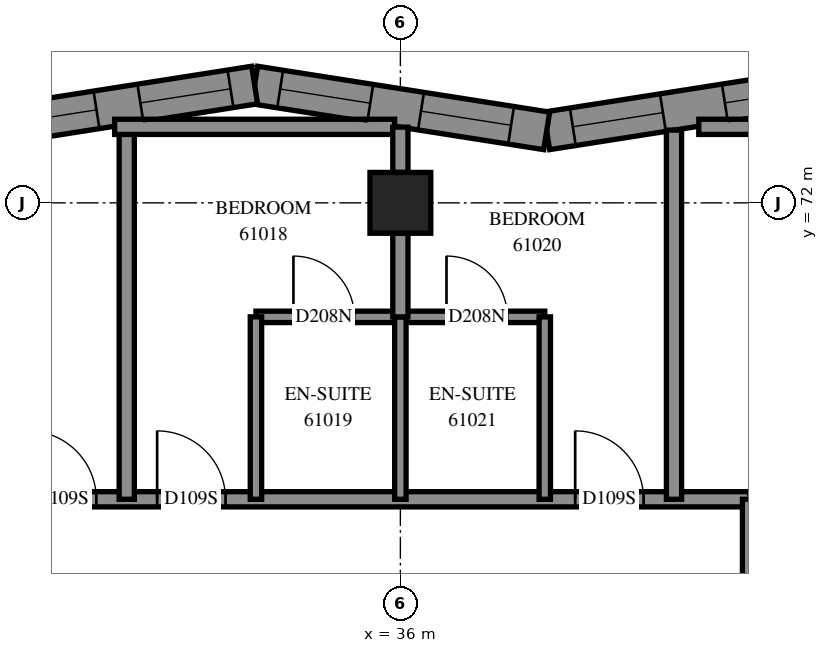
"""IFC4 building model, lengths in metres.
Left out: names, types, materials, properties, quantities, classifications, styles, units other than length and angle.
Written with IfcOpenShell. Run it as: python <this file> out.ifc"""

import sys

from ifc_helpers import new_model, si_unit, direction, frame, frame_2d, origin, origin_2d, place, context, subcontext, project, spatial, polyline, rectangle, outline, extrude, element, fill, save


model = new_model("IFC4")
c1 = context("Model", 3, precision=1e-05, world=origin(), true_north=direction((0.0, 1.0)))
c2 = subcontext(c1, "Body", "Model", "MODEL_VIEW")
j1 = project(units=[si_unit("LENGTHUNIT", "METRE"), si_unit("PLANEANGLEUNIT", "RADIAN")], contexts=[c1])
p1 = place(None, origin())
s1 = spatial("IfcSite", under=j1, at=p1, CompositionType="ELEMENT")
p2 = place(p1, origin())
s2 = spatial("IfcBuilding", under=s1, at=p2, CompositionType="ELEMENT")
p3 = place(p2, frame((0.0, 0.0, 223.6)))
s3 = spatial("IfcBuildingStorey", under=s2, at=p3, CompositionType="ELEMENT", Elevation=223.6)
p4 = place(p3, frame((36.0, 72.0, 0.0), z_axis=(0.0, 0.0, 1.0), x_axis=(1.0, 0.0, 0.0)))
e1 = element("IfcColumn", 1, at=p4, inside=s3, PredefinedType="COLUMN", context=c2, shape_type="SweptSolid", body=[
    extrude(rectangle(XDim=0.8, YDim=0.8, at=origin_2d()), origin(), (0.0, 0.0, 1.0), 3.1),
])
p5 = place(p3, frame((41.768, 73.55, 0.0), z_axis=(0.0, 0.0, 1.0), x_axis=(-0.9879113447, -0.155019918, 0.0)))
e2 = element("IfcWall", 2, at=p5, inside=s3, PredefinedType="SOLIDWALL", context=c2, shape_type="SweptSolid", body=[
    extrude(outline(polyline([(-0.039, -0.25), (3.85, -0.25), (3.929, 0.25), (0.039, 0.25), (-0.039, -0.25)])), origin(), (0.0, 0.0, 1.0), 3.1),
])
p6 = place(p5, frame((0.317, 0.0, 0.45)))
e3 = element("IfcOpeningElement", 3, at=p6, cuts=e2, PredefinedType="OPENING", context=c2, shape_type="SweptSolid", body=[
    extrude(rectangle(XDim=1.2, YDim=2.5, at=frame_2d((0.6, 1.25))), frame((0.0, 0.26, 0.0), z_axis=(0.0, -1.0, 0.0), x_axis=(1.0, 0.0, 0.0)), (0.0, 0.0, 1.0), 0.52),
])
p7 = place(p5, frame((2.342, 0.0, 0.45)))
e4 = element("IfcOpeningElement", 4, at=p7, cuts=e2, PredefinedType="OPENING", context=c2, shape_type="SweptSolid", body=[
    extrude(rectangle(XDim=1.2, YDim=2.5, at=frame_2d((0.6, 1.25))), frame((0.0, 0.26, 0.0), z_axis=(0.0, -1.0, 0.0), x_axis=(1.0, 0.0, 0.0)), (0.0, 0.0, 1.0), 0.52),
])
p8 = place(p3, frame((37.925, 72.947, 0.0), z_axis=(0.0, 0.0, 1.0), x_axis=(-0.9879107269, 0.1550238552, 0.0)))
e5 = element("IfcWall", 5, at=p8, inside=s3, PredefinedType="SOLIDWALL", context=c2, shape_type="SweptSolid", body=[
    extrude(outline(polyline([(0.039, -0.25), (3.929, -0.25), (3.85, 0.25), (-0.039, 0.25), (0.039, -0.25)])), origin(), (0.0, 0.0, 1.0), 3.1),
])
p9 = place(p8, frame((0.474, 0.0, 0.45)))
e6 = element("IfcOpeningElement", 6, at=p9, cuts=e5, PredefinedType="OPENING", context=c2, shape_type="SweptSolid", body=[
    extrude(rectangle(XDim=1.2, YDim=2.5, at=frame_2d((0.6, 1.25))), frame((0.0, 0.26, 0.0), z_axis=(0.0, -1.0, 0.0), x_axis=(1.0, 0.0, 0.0)), (0.0, 0.0, 1.0), 0.52),
])
p10 = place(p8, frame((2.35, 0.0, 0.45)))
e7 = element("IfcOpeningElement", 7, at=p10, cuts=e5, PredefinedType="OPENING", context=c2, shape_type="SweptSolid", body=[
    extrude(rectangle(XDim=1.2, YDim=2.5, at=frame_2d((0.6, 1.25))), frame((0.0, 0.26, 0.0), z_axis=(0.0, -1.0, 0.0), x_axis=(1.0, 0.0, 0.0)), (0.0, 0.0, 1.0), 0.52),
])
p11 = place(p3, frame((34.083, 73.55, 0.0), z_axis=(0.0, 0.0, 1.0), x_axis=(-0.9879139197, -0.1550035072, 0.0)))
e8 = element("IfcWall", 8, at=p11, inside=s3, PredefinedType="SOLIDWALL", context=c2, shape_type="SweptSolid", body=[
    extrude(outline(polyline([(-0.039, -0.25), (3.85, -0.25), (3.967, 0.25), (0.039, 0.25), (-0.039, -0.25)])), origin(), (0.0, 0.0, 1.0), 3.1),
])
p12 = place(p11, frame((0.321, 0.0, 0.45)))
e9 = element("IfcOpeningElement", 9, at=p12, cuts=e8, PredefinedType="OPENING", context=c2, shape_type="SweptSolid", body=[
    extrude(rectangle(XDim=1.2, YDim=2.5, at=frame_2d((0.6, 1.25))), frame((0.0, 0.26, 0.0), z_axis=(0.0, -1.0, 0.0), x_axis=(1.0, 0.0, 0.0)), (0.0, 0.0, 1.0), 0.52),
])
p13 = place(p11, frame((2.106, 0.0, 0.45)))
e10 = element("IfcOpeningElement", 10, at=p13, cuts=e8, PredefinedType="OPENING", context=c2, shape_type="SweptSolid", body=[
    extrude(rectangle(XDim=1.2, YDim=2.5, at=frame_2d((0.6, 1.25))), frame((0.0, 0.26, 0.0), z_axis=(0.0, -1.0, 0.0), x_axis=(1.0, 0.0, 0.0)), (0.0, 0.0, 1.0), 0.52),
])
p14 = place(p3, frame((28.8, 68.1, 0.0), z_axis=(0.0, 0.0, 1.0), x_axis=(1.0, 0.0, 0.0)))
e11 = element("IfcWall", 11, at=p14, inside=s3, PredefinedType="PARTITIONING", context=c2, shape_type="SweptSolid", body=[
    extrude(rectangle(XDim=11.8, YDim=0.2, at=frame_2d((5.9, 0.0))), origin(), (0.0, 0.0, 1.0), 3.1),
])
p15 = place(p14, frame((2.3, 0.0, 0.0)))
e12 = element("IfcOpeningElement", 12, at=p15, cuts=e11, PredefinedType="OPENING", context=c2, shape_type="SweptSolid", body=[
    extrude(rectangle(XDim=0.9, YDim=2.1, at=frame_2d((0.45, 1.05))), frame((0.0, 0.11, 0.0), z_axis=(0.0, -1.0, 0.0), x_axis=(1.0, 0.0, 0.0)), (0.0, 0.0, 1.0), 0.22),
])
p16 = place(p14, frame((4.0, 0.0, 0.0)))
e13 = element("IfcOpeningElement", 13, at=p16, cuts=e11, PredefinedType="OPENING", context=c2, shape_type="SweptSolid", body=[
    extrude(rectangle(XDim=0.9, YDim=2.1, at=frame_2d((0.45, 1.05))), frame((0.0, 0.11, 0.0), z_axis=(0.0, -1.0, 0.0), x_axis=(1.0, 0.0, 0.0)), (0.0, 0.0, 1.0), 0.22),
])
p17 = place(p14, frame((9.5, 0.0, 0.0)))
e14 = element("IfcOpeningElement", 14, at=p17, cuts=e11, PredefinedType="OPENING", context=c2, shape_type="SweptSolid", body=[
    extrude(rectangle(XDim=0.9, YDim=2.1, at=frame_2d((0.45, 1.05))), frame((0.0, 0.11, 0.0), z_axis=(0.0, -1.0, 0.0), x_axis=(1.0, 0.0, 0.0)), (0.0, 0.0, 1.0), 0.22),
])
p18 = place(p3, frame((32.4, 68.1, 0.0), z_axis=(0.0, 0.0, 1.0), x_axis=(0.0, 1.0, 0.0)))
e15 = element("IfcWall", 15, at=p18, inside=s3, PredefinedType="PARTITIONING", context=c2, shape_type="SweptSolid", body=[
    extrude(rectangle(XDim=4.933, YDim=0.2, at=frame_2d((2.466, 0.0))), origin(), (0.0, 0.0, 1.0), 3.1),
])
p19 = place(p3, frame((39.6, 68.1, 0.0), z_axis=(0.0, 0.0, 1.0), x_axis=(0.0, 1.0, 0.0)))
e16 = element("IfcWall", 16, at=p19, inside=s3, PredefinedType="PARTITIONING", context=c2, shape_type="SweptSolid", body=[
    extrude(rectangle(XDim=4.857, YDim=0.2, at=frame_2d((2.428, 0.0))), origin(), (0.0, 0.0, 1.0), 3.1),
])
p20 = place(p3, frame((40.6, 63.402, 0.0), z_axis=(0.0, 0.0, 1.0), x_axis=(0.0, 1.0, 0.0)))
e17 = element("IfcWall", 17, at=p20, inside=s3, PredefinedType="PARTITIONING", context=c2, shape_type="SweptSolid", body=[
    extrude(rectangle(XDim=4.698, YDim=0.2, at=frame_2d((2.349, 0.0))), origin(), (0.0, 0.0, 1.0), 3.1),
])
p21 = place(p20, frame((0.146, 0.0, 0.0)))
e18 = element("IfcOpeningElement", 18, at=p21, cuts=e17, PredefinedType="OPENING", context=c2, shape_type="SweptSolid", body=[
    extrude(rectangle(XDim=1.0, YDim=2.1, at=frame_2d((0.5, 1.05))), frame((0.0, 0.11, 0.0), z_axis=(0.0, -1.0, 0.0), x_axis=(1.0, 0.0, 0.0)), (0.0, 0.0, 1.0), 0.22),
])
p22 = place(p3, frame((34.1, 70.5, 0.0), z_axis=(0.0, 0.0, 1.0), x_axis=(1.0, 0.0, 0.0)))
e19 = element("IfcWall", 19, at=p22, inside=s3, PredefinedType="PARTITIONING", context=c2, shape_type="SweptSolid", body=[
    extrude(rectangle(XDim=3.8, YDim=0.15, at=frame_2d((1.9, 0.0))), origin(), (0.0, 0.0, 1.0), 3.1),
])
p23 = place(p22, frame((0.493, 0.0, 0.0)))
e20 = element("IfcOpeningElement", 20, at=p23, cuts=e19, PredefinedType="OPENING", context=c2, shape_type="SweptSolid", body=[
    extrude(rectangle(XDim=0.8, YDim=2.1, at=frame_2d((0.4, 1.05))), frame((0.0, 0.085, 0.0), z_axis=(0.0, -1.0, 0.0), x_axis=(1.0, 0.0, 0.0)), (0.0, 0.0, 1.0), 0.17),
])
p24 = place(p22, frame((2.507, 0.0, 0.0)))
e21 = element("IfcOpeningElement", 21, at=p24, cuts=e19, PredefinedType="OPENING", context=c2, shape_type="SweptSolid", body=[
    extrude(rectangle(XDim=0.8, YDim=2.1, at=frame_2d((0.4, 1.05))), frame((0.0, 0.085, 0.0), z_axis=(0.0, -1.0, 0.0), x_axis=(1.0, 0.0, 0.0)), (0.0, 0.0, 1.0), 0.17),
])
for number, where, z_axis, x_axis in (
    (22, (32.24, 73.0, 0.0), (0.0, 0.0, 1.0), (1.0, 0.0, 0.0)),
    (23, (39.926, 73.0, 0.0), (0.0, 0.0, 1.0), (1.0, 0.0, 0.0)),
):
    element("IfcWall", number, at=place(p3, frame(where, z_axis=z_axis, x_axis=x_axis)), inside=s3, PredefinedType="PARTITIONING", context=c2, shape_type="SweptSolid", body=[
        extrude(rectangle(XDim=3.684, YDim=0.2, at=frame_2d((1.842, 0.0))), origin(), (0.0, 0.0, 1.0), 3.1),
    ])
for number, where, z_axis, x_axis in (
    (24, (34.1, 68.1, 0.0), (0.0, 0.0, 1.0), (0.0, 1.0, 0.0)),
    (25, (37.9, 68.1, 0.0), (0.0, 0.0, 1.0), (0.0, 1.0, 0.0)),
    (26, (36.0, 68.1, 0.0), (0.0, 0.0, 1.0), (0.0, 1.0, 0.0)),
):
    element("IfcWall", number, at=place(p3, frame(where, z_axis=z_axis, x_axis=x_axis)), inside=s3, PredefinedType="PARTITIONING", context=c2, shape_type="SweptSolid", body=[
        extrude(rectangle(XDim=2.4, YDim=0.15, at=frame_2d((1.2, 0.0))), origin(), (0.0, 0.0, 1.0), 3.1),
    ])
p25 = place(p3, frame((36.0, 70.5, 0.0), z_axis=(0.0, 0.0, 1.0), x_axis=(0.0, 1.0, 0.0)))
e27 = element("IfcWall", 27, at=p25, inside=s3, PredefinedType="PARTITIONING", context=c2, shape_type="SweptSolid", body=[
    extrude(rectangle(XDim=1.1, YDim=0.2, at=frame_2d((0.55, 0.0))), origin(), (0.0, 0.0, 1.0), 3.1),
])
p26 = place(p3, frame((36.0, 72.4, 0.0), z_axis=(0.0, 0.0, 1.0), x_axis=(0.0, 1.0, 0.0)))
e28 = element("IfcWall", 28, at=p26, inside=s3, PredefinedType="PARTITIONING", context=c2, shape_type="SweptSolid", body=[
    extrude(rectangle(XDim=0.596, YDim=0.2, at=frame_2d((0.298, 0.0))), origin(), (0.0, 0.0, 1.0), 3.1),
])
p27 = place(p6, origin())
e29 = element("IfcWindow", 29, at=p27, inside=s3, PartitioningType="SINGLE_PANEL", PredefinedType="WINDOW", context=c2, shape_type="SweptSolid", body=[
    extrude(rectangle(XDim=1.2, YDim=2.5, at=frame_2d((0.6, 1.25))), frame((0.0, 0.18, 0.0), z_axis=(0.0, -1.0, 0.0), x_axis=(1.0, 0.0, 0.0)), (0.0, 0.0, 1.0), 0.06),
])
fill(e3, e29)
p28 = place(p7, origin())
e30 = element("IfcWindow", 30, at=p28, inside=s3, PartitioningType="SINGLE_PANEL", PredefinedType="WINDOW", context=c2, shape_type="SweptSolid", body=[
    extrude(rectangle(XDim=1.2, YDim=2.5, at=frame_2d((0.6, 1.25))), frame((0.0, 0.18, 0.0), z_axis=(0.0, -1.0, 0.0), x_axis=(1.0, 0.0, 0.0)), (0.0, 0.0, 1.0), 0.06),
])
fill(e4, e30)
p29 = place(p9, origin())
e31 = element("IfcWindow", 31, at=p29, inside=s3, PartitioningType="SINGLE_PANEL", PredefinedType="WINDOW", context=c2, shape_type="SweptSolid", body=[
    extrude(rectangle(XDim=1.2, YDim=2.5, at=frame_2d((0.6, 1.25))), frame((0.0, 0.18, 0.0), z_axis=(0.0, -1.0, 0.0), x_axis=(1.0, 0.0, 0.0)), (0.0, 0.0, 1.0), 0.06),
])
fill(e6, e31)
p30 = place(p10, origin())
e32 = element("IfcWindow", 32, at=p30, inside=s3, PartitioningType="SINGLE_PANEL", PredefinedType="WINDOW", context=c2, shape_type="SweptSolid", body=[
    extrude(rectangle(XDim=1.2, YDim=2.5, at=frame_2d((0.6, 1.25))), frame((0.0, 0.18, 0.0), z_axis=(0.0, -1.0, 0.0), x_axis=(1.0, 0.0, 0.0)), (0.0, 0.0, 1.0), 0.06),
])
fill(e7, e32)
p31 = place(p12, origin())
e33 = element("IfcWindow", 33, at=p31, inside=s3, PartitioningType="SINGLE_PANEL", PredefinedType="WINDOW", context=c2, shape_type="SweptSolid", body=[
    extrude(rectangle(XDim=1.2, YDim=2.5, at=frame_2d((0.6, 1.25))), frame((0.0, 0.18, 0.0), z_axis=(0.0, -1.0, 0.0), x_axis=(1.0, 0.0, 0.0)), (0.0, 0.0, 1.0), 0.06),
])
fill(e9, e33)
p32 = place(p13, origin())
e34 = element("IfcWindow", 34, at=p32, inside=s3, PartitioningType="SINGLE_PANEL", PredefinedType="WINDOW", context=c2, shape_type="SweptSolid", body=[
    extrude(rectangle(XDim=1.2, YDim=2.5, at=frame_2d((0.6, 1.25))), frame((0.0, 0.18, 0.0), z_axis=(0.0, -1.0, 0.0), x_axis=(1.0, 0.0, 0.0)), (0.0, 0.0, 1.0), 0.06),
])
fill(e10, e34)
p33 = place(p15, origin())
e35 = element("IfcDoor", 35, at=p33, inside=s3, OperationType="SINGLE_SWING_RIGHT", PredefinedType="DOOR", context=c2, shape_type="SweptSolid", body=[
    extrude(rectangle(XDim=0.9, YDim=2.1, at=frame_2d((0.45, 1.05))), frame((0.0, 0.025, 0.0), z_axis=(0.0, -1.0, 0.0), x_axis=(1.0, 0.0, 0.0)), (0.0, 0.0, 1.0), 0.05),
])
fill(e12, e35)
p34 = place(p16, origin())
e36 = element("IfcDoor", 36, at=p34, inside=s3, OperationType="SINGLE_SWING_LEFT", PredefinedType="DOOR", context=c2, shape_type="SweptSolid", body=[
    extrude(rectangle(XDim=0.9, YDim=2.1, at=frame_2d((0.45, 1.05))), frame((0.0, 0.025, 0.0), z_axis=(0.0, -1.0, 0.0), x_axis=(1.0, 0.0, 0.0)), (0.0, 0.0, 1.0), 0.05),
])
fill(e13, e36)
p35 = place(p23, origin())
e37 = element("IfcDoor", 37, at=p35, inside=s3, OperationType="SINGLE_SWING_RIGHT", PredefinedType="DOOR", context=c2, shape_type="SweptSolid", body=[
    extrude(rectangle(XDim=0.8, YDim=2.1, at=frame_2d((0.4, 1.05))), frame((0.0, 0.025, 0.0), z_axis=(0.0, -1.0, 0.0), x_axis=(1.0, 0.0, 0.0)), (0.0, 0.0, 1.0), 0.05),
])
fill(e20, e37)
p36 = place(p17, origin())
e38 = element("IfcDoor", 38, at=p36, inside=s3, OperationType="SINGLE_SWING_RIGHT", PredefinedType="DOOR", context=c2, shape_type="SweptSolid", body=[
    extrude(rectangle(XDim=0.9, YDim=2.1, at=frame_2d((0.45, 1.05))), frame((0.0, 0.025, 0.0), z_axis=(0.0, -1.0, 0.0), x_axis=(1.0, 0.0, 0.0)), (0.0, 0.0, 1.0), 0.05),
])
fill(e14, e38)
p37 = place(p24, origin())
e39 = element("IfcDoor", 39, at=p37, inside=s3, OperationType="SINGLE_SWING_RIGHT", PredefinedType="DOOR", context=c2, shape_type="SweptSolid", body=[
    extrude(rectangle(XDim=0.8, YDim=2.1, at=frame_2d((0.4, 1.05))), frame((0.0, 0.025, 0.0), z_axis=(0.0, -1.0, 0.0), x_axis=(1.0, 0.0, 0.0)), (0.0, 0.0, 1.0), 0.05),
])
fill(e21, e39)
save(model, sys.argv[1])
